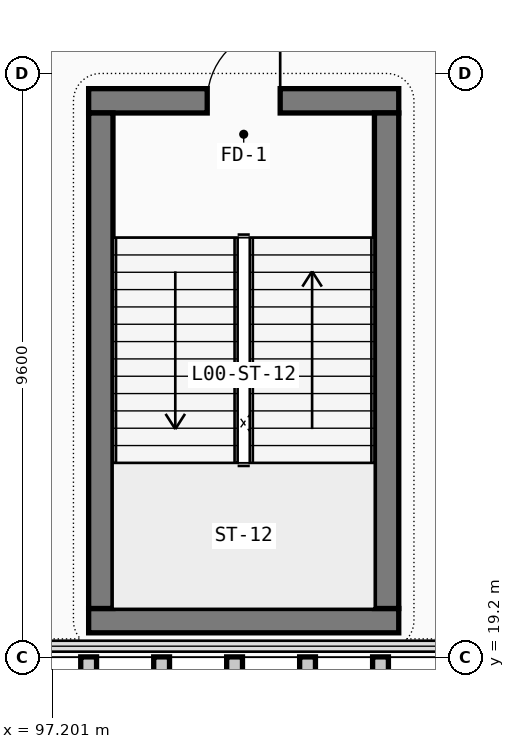
"""IFC4 building model, lengths in metres.
Left out: names, types, materials, properties, quantities, classifications, styles, units other than length and angle.
Written with IfcOpenShell. Run it as: python <this file> out.ifc"""

import sys

from ifc_helpers import new_model, si_unit, direction, frame, frame_2d, origin, place, context, subcontext, project, spatial, rectangle, extrude, element, fill, save


model = new_model("IFC4")
c1 = context("Model", 3, precision=1e-05, world=origin(), true_north=direction((0.0, 1.0)))
c2 = subcontext(c1, "Body", "Model", "MODEL_VIEW")
j1 = project(units=[si_unit("LENGTHUNIT", "METRE"), si_unit("PLANEANGLEUNIT", "RADIAN")], contexts=[c1])
p1 = place(None, origin())
s1 = spatial("IfcSite", under=j1, at=p1, CompositionType="ELEMENT")
p2 = place(p1, origin())
s2 = spatial("IfcBuilding", under=s1, at=p2, CompositionType="ELEMENT")
p3 = place(p2, origin())
s3 = spatial("IfcBuildingStorey", under=s2, at=p3, CompositionType="ELEMENT", Elevation=0.0)
p4 = place(p3, frame((97.8, 19.8, 0.0), z_axis=(0.0, 0.0, 1.0), x_axis=(1.0, 0.0, 0.0)))
e1 = element("IfcWall", 1, at=p4, inside=s3, PredefinedType="SHEAR", context=c2, shape_type="SweptSolid", body=[
    extrude(rectangle(XDim=5.1, YDim=0.4, at=frame_2d((2.55, 0.0))), origin(), (0.0, 0.0, 1.0), 4.5),
])
p5 = place(p3, frame((102.9, 28.35, 0.0), z_axis=(0.0, 0.0, 1.0), x_axis=(-1.0, 0.0, 0.0)))
e2 = element("IfcWall", 2, at=p5, inside=s3, PredefinedType="SHEAR", context=c2, shape_type="SweptSolid", body=[
    extrude(rectangle(XDim=5.1, YDim=0.4, at=frame_2d((2.55, 0.0))), origin(), (0.0, 0.0, 1.0), 4.5),
])
p6 = place(p5, frame((3.15, 0.0, 0.0), z_axis=(0.0, 0.0, 1.0), x_axis=(-1.0, 0.0, 0.0)))
e3 = element("IfcOpeningElement", 3, at=p6, cuts=e2, PredefinedType="OPENING", context=c2, shape_type="SweptSolid", body=[
    extrude(rectangle(XDim=1.2, YDim=2.2, at=frame_2d((0.6, 1.1))), frame((0.0, 0.21, 0.0), z_axis=(0.0, -1.0, 0.0), x_axis=(1.0, 0.0, 0.0)), (0.0, 0.0, 1.0), 0.42),
])
for number, where, z_axis, x_axis in (
    (4, (98.0, 28.15, 0.0), (0.0, 0.0, 1.0), (0.0, -1.0, 0.0)),
    (5, (102.7, 20.0, 0.0), (0.0, 0.0, 1.0), (0.0, 1.0, 0.0)),
):
    element("IfcWall", number, at=place(p3, frame(where, z_axis=z_axis, x_axis=x_axis)), inside=s3, PredefinedType="SHEAR", context=c2, shape_type="SweptSolid", body=[
        extrude(rectangle(XDim=8.15, YDim=0.4, at=frame_2d((4.075, 0.0))), origin(), (0.0, 0.0, 1.0), 4.5),
    ])
p7 = place(p6, origin())
e6 = element("IfcDoor", 6, at=p7, inside=s3, OperationType="SINGLE_SWING_RIGHT", PredefinedType="DOOR", context=c2, shape_type="SweptSolid", body=[
    extrude(rectangle(XDim=1.2, YDim=2.2, at=frame_2d((0.6, 1.1))), frame((0.0, 0.025, 0.0), z_axis=(0.0, -1.0, 0.0), x_axis=(1.0, 0.0, 0.0)), (0.0, 0.0, 1.0), 0.05),
])
fill(e3, e6)
save(model, sys.argv[1])
